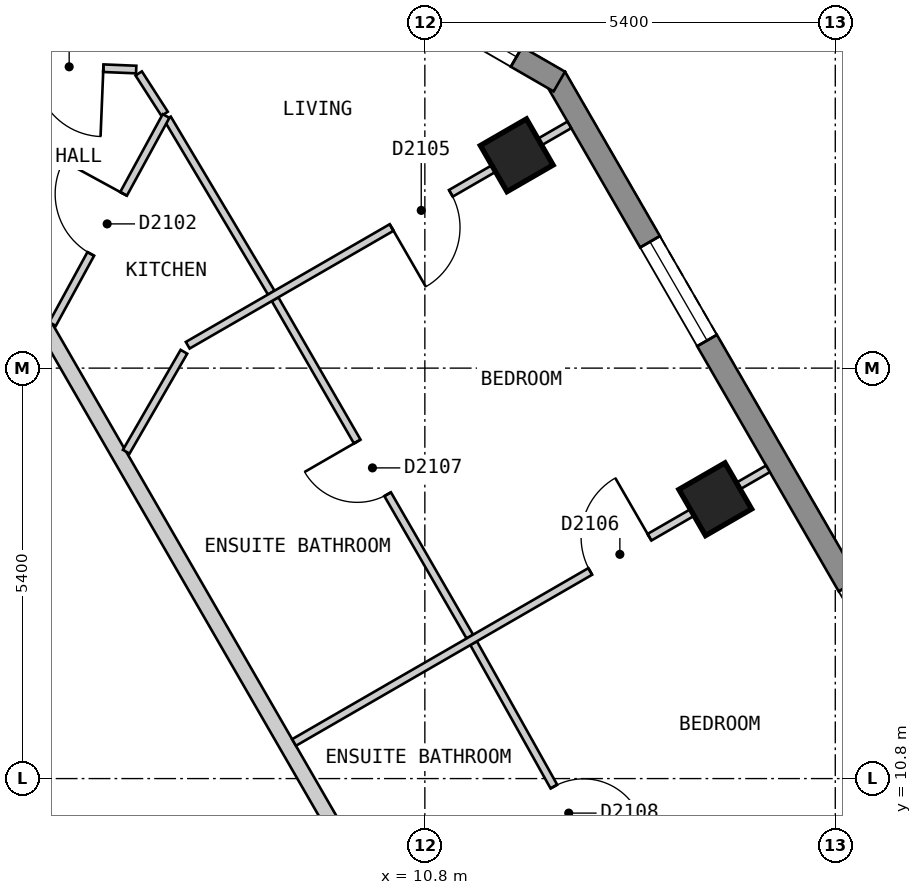
"""IFC4 building model, lengths in metres.
Left out: names, types, materials, properties, quantities, classifications, styles, units other than length and angle.
Written with IfcOpenShell. Run it as: python <this file> out.ifc"""

import sys

from ifc_helpers import new_model, si_unit, direction, frame, frame_2d, origin, origin_2d, place, context, subcontext, project, spatial, polyline, rectangle, outline, extrude, element, fill, save


model = new_model("IFC4")
c1 = context("Model", 3, precision=1e-05, world=origin(), true_north=direction((0.0, 1.0)))
c2 = subcontext(c1, "Body", "Model", "MODEL_VIEW")
j1 = project(units=[si_unit("LENGTHUNIT", "METRE"), si_unit("PLANEANGLEUNIT", "RADIAN")], contexts=[c1])
p1 = place(None, origin())
s1 = spatial("IfcSite", under=j1, at=p1, CompositionType="ELEMENT")
p2 = place(p1, origin())
s2 = spatial("IfcBuilding", under=s1, at=p2, CompositionType="ELEMENT")
p3 = place(p2, frame((0.0, 0.0, 217.8)))
s3 = spatial("IfcBuildingStorey", under=s2, at=p3, CompositionType="ELEMENT", Elevation=217.8)
for number, where, z_axis, x_axis in (
    (1, (14.621, 14.475, 0.0), (0.0, 0.0, 1.0), (-0.5, 0.866, 0.0)),
    (2, (12.009, 19.0, 0.0), (0.0, 0.0, 1.0), (-0.5, 0.866, 0.0)),
):
    element("IfcColumn", number, at=place(p3, frame(where, z_axis=z_axis, x_axis=x_axis)), inside=s3, PredefinedType="COLUMN", context=c2, shape_type="SweptSolid", body=[
        extrude(rectangle(XDim=0.7, YDim=0.7, at=origin_2d()), origin(), (0.0, 0.0, 1.0), 3.0),
    ])
p4 = place(p3, frame((23.599, 0.825, 0.0), z_axis=(0.0, 0.0, 1.0), x_axis=(-0.500003656944, 0.866023292436, 0.0)))
e3 = element("IfcWall", 3, at=p4, inside=s3, PredefinedType="SOLIDWALL", context=c2, shape_type="SweptSolid", body=[
    extrude(outline(polyline([(0.0, -0.15), (22.17, -0.15), (22.09, 0.15), (0.08, 0.15), (0.0, -0.15)])), origin(), (0.0, 0.0, 1.0), 2.7),
])
p5 = place(p4, frame((2.497, 0.0, 0.15)))
e4 = element("IfcOpeningElement", 4, at=p5, cuts=e3, PredefinedType="OPENING", context=c2, shape_type="SweptSolid", body=[
    extrude(rectangle(XDim=1.5, YDim=2.1, at=frame_2d((0.75, 1.05))), frame((0.0, 0.16, 0.0), z_axis=(0.0, -1.0, 0.0), x_axis=(1.0, 0.0, 0.0)), (0.0, 0.0, 1.0), 0.32),
])
p6 = place(p4, frame((7.723, 0.0, 0.15)))
e5 = element("IfcOpeningElement", 5, at=p6, cuts=e3, PredefinedType="OPENING", context=c2, shape_type="SweptSolid", body=[
    extrude(rectangle(XDim=1.5, YDim=2.1, at=frame_2d((0.75, 1.05))), frame((0.0, 0.16, 0.0), z_axis=(0.0, -1.0, 0.0), x_axis=(1.0, 0.0, 0.0)), (0.0, 0.0, 1.0), 0.32),
])
p7 = place(p4, frame((12.948, 0.0, 0.15)))
e6 = element("IfcOpeningElement", 6, at=p7, cuts=e3, PredefinedType="OPENING", context=c2, shape_type="SweptSolid", body=[
    extrude(rectangle(XDim=1.5, YDim=2.1, at=frame_2d((0.75, 1.05))), frame((0.0, 0.16, 0.0), z_axis=(0.0, -1.0, 0.0), x_axis=(1.0, 0.0, 0.0)), (0.0, 0.0, 1.0), 0.32),
])
p8 = place(p4, frame((18.173, 0.0, 0.15)))
e7 = element("IfcOpeningElement", 7, at=p8, cuts=e3, PredefinedType="OPENING", context=c2, shape_type="SweptSolid", body=[
    extrude(rectangle(XDim=1.5, YDim=2.1, at=frame_2d((0.75, 1.05))), frame((0.0, 0.16, 0.0), z_axis=(0.0, -1.0, 0.0), x_axis=(1.0, 0.0, 0.0)), (0.0, 0.0, 1.0), 0.32),
])
p9 = place(p3, frame((12.569, 19.97, 0.0), z_axis=(0.0, 0.0, 1.0), x_axis=(-0.866022959057, 0.500004234368, 0.0)))
e8 = element("IfcWall", 8, at=p9, inside=s3, PredefinedType="SOLIDWALL", context=c2, shape_type="SweptSolid", body=[
    extrude(outline(polyline([(0.0, -0.15), (5.0, -0.15), (4.92, 0.15), (0.08, 0.15), (0.0, -0.15)])), origin(), (0.0, 0.0, 1.0), 2.7),
])
p10 = place(p9, frame((0.65, 0.0, 0.15)))
e9 = element("IfcOpeningElement", 9, at=p10, cuts=e8, PredefinedType="OPENING", context=c2, shape_type="SweptSolid", body=[
    extrude(rectangle(XDim=1.2, YDim=2.1, at=frame_2d((0.6, 1.05))), frame((0.0, 0.16, 0.0), z_axis=(0.0, -1.0, 0.0), x_axis=(1.0, 0.0, 0.0)), (0.0, 0.0, 1.0), 0.32),
])
p11 = place(p3, frame((5.485, 17.3, 0.0), z_axis=(0.0, 0.0, 1.0), x_axis=(0.499943285704, -0.866058145322, 0.0)))
e10 = element("IfcWall", 10, at=p11, inside=s3, PredefinedType="PARTITIONING", context=c2, shape_type="SweptSolid", body=[
    extrude(rectangle(XDim=10.623, YDim=0.2, at=frame_2d((5.312, 0.0))), origin(), (0.0, 0.0, 1.0), 2.7),
])
p12 = place(p3, frame((7.035, 20.077, 0.0), z_axis=(0.0, 0.0, 1.0), x_axis=(0.540425167977, -0.841392083286, 0.0)))
e11 = element("IfcWall", 11, at=p12, inside=s3, PredefinedType="PARTITIONING", context=c2, shape_type="SweptSolid", body=[
    extrude(rectangle(XDim=0.631, YDim=0.1, at=frame_2d((0.315, 0.0))), origin(), (0.0, 0.0, 1.0), 2.7),
])
p13 = place(p3, frame((7.414, 19.484, 0.0), z_axis=(0.0, 0.0, 1.0), x_axis=(0.511881371655, -0.859056145634, 0.0)))
e12 = element("IfcWall", 12, at=p13, inside=s3, PredefinedType="PARTITIONING", context=c2, shape_type="SweptSolid", body=[
    extrude(rectangle(XDim=2.667, YDim=0.1, at=frame_2d((1.333, 0.0))), origin(), (0.0, 0.0, 1.0), 2.7),
])
p14 = place(p3, frame((8.829, 17.107, 0.0), z_axis=(0.0, 0.0, 1.0), x_axis=(0.500022055211, -0.866012669828, 0.0)))
e13 = element("IfcWall", 13, at=p14, inside=s3, PredefinedType="PARTITIONING", context=c2, shape_type="SweptSolid", body=[
    extrude(rectangle(XDim=5.126, YDim=0.1, at=frame_2d((2.563, 0.0))), origin(), (0.0, 0.0, 1.0), 2.7),
])
p15 = place(p14, frame((2.163, 0.0, 0.0)))
e14 = element("IfcOpeningElement", 14, at=p15, cuts=e13, PredefinedType="OPENING", context=c2, shape_type="SweptSolid", body=[
    extrude(rectangle(XDim=0.8, YDim=2.1, at=frame_2d((0.4, 1.05))), frame((0.0, 0.06, 0.0), z_axis=(0.0, -1.0, 0.0), x_axis=(1.0, 0.0, 0.0)), (0.0, 0.0, 1.0), 0.12),
])
p16 = place(p3, frame((11.441, 12.582, 0.0), z_axis=(0.0, 0.0, 1.0), x_axis=(0.488568218554, -0.872525699231, 0.0)))
e15 = element("IfcWall", 15, at=p16, inside=s3, PredefinedType="PARTITIONING", context=c2, shape_type="SweptSolid", body=[
    extrude(rectangle(XDim=5.076, YDim=0.1, at=frame_2d((2.538, 0.0))), origin(), (0.0, 0.0, 1.0), 2.7),
])
p17 = place(p16, frame((2.163, 0.0, 0.0)))
e16 = element("IfcOpeningElement", 16, at=p17, cuts=e15, PredefinedType="OPENING", context=c2, shape_type="SweptSolid", body=[
    extrude(rectangle(XDim=0.8, YDim=2.1, at=frame_2d((0.4, 1.05))), frame((0.0, 0.06, 0.0), z_axis=(0.0, -1.0, 0.0), x_axis=(1.0, 0.0, 0.0)), (0.0, 0.0, 1.0), 0.12),
])
p18 = place(p3, frame((5.294, 20.198, 0.0), z_axis=(0.0, 0.0, 1.0), x_axis=(0.999159599203, -0.040988965834, 0.0)))
e17 = element("IfcWall", 17, at=p18, inside=s3, PredefinedType="PARTITIONING", context=c2, shape_type="SweptSolid", body=[
    extrude(rectangle(XDim=1.709, YDim=0.1, at=frame_2d((0.855, 0.0))), origin(), (0.0, 0.0, 1.0), 2.7),
])
p19 = place(p18, frame((0.377, 0.0, 0.0)))
e18 = element("IfcOpeningElement", 18, at=p19, cuts=e17, PredefinedType="OPENING", context=c2, shape_type="SweptSolid", body=[
    extrude(rectangle(XDim=0.9, YDim=2.1, at=frame_2d((0.45, 1.05))), frame((0.0, 0.06, 0.0), z_axis=(0.0, -1.0, 0.0), x_axis=(1.0, 0.0, 0.0)), (0.0, 0.0, 1.0), 0.12),
])
p20 = place(p3, frame((6.871, 15.1, 0.0), z_axis=(0.0, 0.0, 1.0), x_axis=(0.499805980977, 0.866137391745, 0.0)))
e19 = element("IfcWall", 19, at=p20, inside=s3, PredefinedType="PARTITIONING", context=c2, shape_type="SweptSolid", body=[
    extrude(rectangle(XDim=1.518, YDim=0.1, at=frame_2d((0.759, 0.0))), origin(), (0.0, 0.0, 1.0), 2.7),
])
p21 = place(p3, frame((5.901, 16.78, 0.0), z_axis=(0.0, 0.0, 1.0), x_axis=(0.479148317257, 0.877733951759, 0.0)))
e20 = element("IfcWall", 20, at=p21, inside=s3, PredefinedType="PARTITIONING", context=c2, shape_type="SweptSolid", body=[
    extrude(rectangle(XDim=3.118, YDim=0.1, at=frame_2d((1.559, 0.0))), origin(), (0.0, 0.0, 1.0), 2.7),
])
p22 = place(p21, frame((1.051, 0.0, 0.0)))
e21 = element("IfcOpeningElement", 21, at=p22, cuts=e20, PredefinedType="OPENING", context=c2, shape_type="SweptSolid", body=[
    extrude(rectangle(XDim=0.9, YDim=2.1, at=frame_2d((0.45, 1.05))), frame((0.0, 0.06, 0.0), z_axis=(0.0, -1.0, 0.0), x_axis=(1.0, 0.0, 0.0)), (0.0, 0.0, 1.0), 0.12),
])
p23 = place(p3, frame((9.079, 11.275, 0.0), z_axis=(0.0, 0.0, 1.0), x_axis=(0.866001485781, 0.500041424909, 0.0)))
e22 = element("IfcWall", 22, at=p23, inside=s3, PredefinedType="PARTITIONING", context=c2, shape_type="SweptSolid", body=[
    extrude(rectangle(XDim=7.2, YDim=0.1, at=frame_2d((3.6, 0.0))), origin(), (0.0, 0.0, 1.0), 2.7),
])
p24 = place(p23, frame((4.5, 0.0, 0.0)))
e23 = element("IfcOpeningElement", 23, at=p24, cuts=e22, PredefinedType="OPENING", context=c2, shape_type="SweptSolid", body=[
    extrude(rectangle(XDim=0.9, YDim=2.1, at=frame_2d((0.45, 1.05))), frame((0.0, 0.06, 0.0), z_axis=(0.0, -1.0, 0.0), x_axis=(1.0, 0.0, 0.0)), (0.0, 0.0, 1.0), 0.12),
])
p25 = place(p3, frame((7.68, 16.501, 0.0), z_axis=(0.0, 0.0, 1.0), x_axis=(0.86602149507, 0.500006770031, 0.0)))
e24 = element("IfcWall", 24, at=p25, inside=s3, PredefinedType="PARTITIONING", context=c2, shape_type="SweptSolid", body=[
    extrude(rectangle(XDim=5.798, YDim=0.1, at=frame_2d((2.899, 0.0))), origin(), (0.0, 0.0, 1.0), 2.7),
])
p26 = place(p25, frame((3.098, 0.0, 0.0)))
e25 = element("IfcOpeningElement", 25, at=p26, cuts=e24, PredefinedType="OPENING", context=c2, shape_type="SweptSolid", body=[
    extrude(rectangle(XDim=0.9, YDim=2.1, at=frame_2d((0.45, 1.05))), frame((0.0, 0.06, 0.0), z_axis=(0.0, -1.0, 0.0), x_axis=(1.0, 0.0, 0.0)), (0.0, 0.0, 1.0), 0.12),
])
p27 = place(p3, frame((9.354, 5.401, 0.0), z_axis=(0.0, 0.0, 1.0), x_axis=(0.866018411306, 0.500012111133, 0.0)))
e26 = element("IfcWall", 26, at=p27, inside=s3, PredefinedType="PARTITIONING", context=c2, shape_type="SweptSolid", body=[
    extrude(rectangle(XDim=9.898, YDim=0.2, at=frame_2d((4.949, 0.0))), origin(), (0.0, 0.0, 1.0), 2.7),
])
p28 = place(p8, origin())
e27 = element("IfcWindow", 27, at=p28, inside=s3, PartitioningType="SINGLE_PANEL", PredefinedType="WINDOW", context=c2, shape_type="SweptSolid", body=[
    extrude(rectangle(XDim=1.5, YDim=2.1, at=frame_2d((0.75, 1.05))), frame((0.0, 0.03, 0.0), z_axis=(0.0, -1.0, 0.0), x_axis=(1.0, 0.0, 0.0)), (0.0, 0.0, 1.0), 0.06),
])
fill(e7, e27)
p29 = place(p10, origin())
e28 = element("IfcWindow", 28, at=p29, inside=s3, PartitioningType="SINGLE_PANEL", PredefinedType="WINDOW", context=c2, shape_type="SweptSolid", body=[
    extrude(rectangle(XDim=1.2, YDim=2.1, at=frame_2d((0.6, 1.05))), frame((0.0, 0.03, 0.0), z_axis=(0.0, -1.0, 0.0), x_axis=(1.0, 0.0, 0.0)), (0.0, 0.0, 1.0), 0.06),
])
fill(e9, e28)
p30 = place(p22, origin())
e29 = element("IfcDoor", 29, at=p30, inside=s3, OperationType="SINGLE_SWING_RIGHT", PredefinedType="DOOR", context=c2, shape_type="SweptSolid", body=[
    extrude(rectangle(XDim=0.9, YDim=2.1, at=frame_2d((0.45, 1.05))), frame((0.0, 0.025, 0.0), z_axis=(0.0, -1.0, 0.0), x_axis=(1.0, 0.0, 0.0)), (0.0, 0.0, 1.0), 0.05),
])
fill(e21, e29)
p31 = place(p19, origin())
e30 = element("IfcDoor", 30, at=p31, inside=s3, OperationType="SINGLE_SWING_RIGHT", PredefinedType="DOOR", context=c2, shape_type="SweptSolid", body=[
    extrude(rectangle(XDim=0.9, YDim=2.1, at=frame_2d((0.45, 1.05))), frame((0.0, 0.025, 0.0), z_axis=(0.0, -1.0, 0.0), x_axis=(1.0, 0.0, 0.0)), (0.0, 0.0, 1.0), 0.05),
])
fill(e18, e30)
p32 = place(p26, origin())
e31 = element("IfcDoor", 31, at=p32, inside=s3, OperationType="SINGLE_SWING_LEFT", PredefinedType="DOOR", context=c2, shape_type="SweptSolid", body=[
    extrude(rectangle(XDim=0.9, YDim=2.1, at=frame_2d((0.45, 1.05))), frame((0.0, 0.025, 0.0), z_axis=(0.0, -1.0, 0.0), x_axis=(1.0, 0.0, 0.0)), (0.0, 0.0, 1.0), 0.05),
])
fill(e25, e31)
p33 = place(p24, origin())
e32 = element("IfcDoor", 32, at=p33, inside=s3, OperationType="SINGLE_SWING_RIGHT", PredefinedType="DOOR", context=c2, shape_type="SweptSolid", body=[
    extrude(rectangle(XDim=0.9, YDim=2.1, at=frame_2d((0.45, 1.05))), frame((0.0, 0.025, 0.0), z_axis=(0.0, -1.0, 0.0), x_axis=(1.0, 0.0, 0.0)), (0.0, 0.0, 1.0), 0.05),
])
fill(e23, e32)
p34 = place(p15, origin())
e33 = element("IfcDoor", 33, at=p34, inside=s3, OperationType="SINGLE_SWING_LEFT", PredefinedType="DOOR", context=c2, shape_type="SweptSolid", body=[
    extrude(rectangle(XDim=0.8, YDim=2.1, at=frame_2d((0.4, 1.05))), frame((0.0, 0.025, 0.0), z_axis=(0.0, -1.0, 0.0), x_axis=(1.0, 0.0, 0.0)), (0.0, 0.0, 1.0), 0.05),
])
fill(e14, e33)
p35 = place(p17, origin())
e34 = element("IfcDoor", 34, at=p35, inside=s3, OperationType="SINGLE_SWING_RIGHT", PredefinedType="DOOR", context=c2, shape_type="SweptSolid", body=[
    extrude(rectangle(XDim=0.8, YDim=2.1, at=frame_2d((0.4, 1.05))), frame((0.0, 0.025, 0.0), z_axis=(0.0, -1.0, 0.0), x_axis=(1.0, 0.0, 0.0)), (0.0, 0.0, 1.0), 0.05),
])
fill(e16, e34)
save(model, sys.argv[1])
